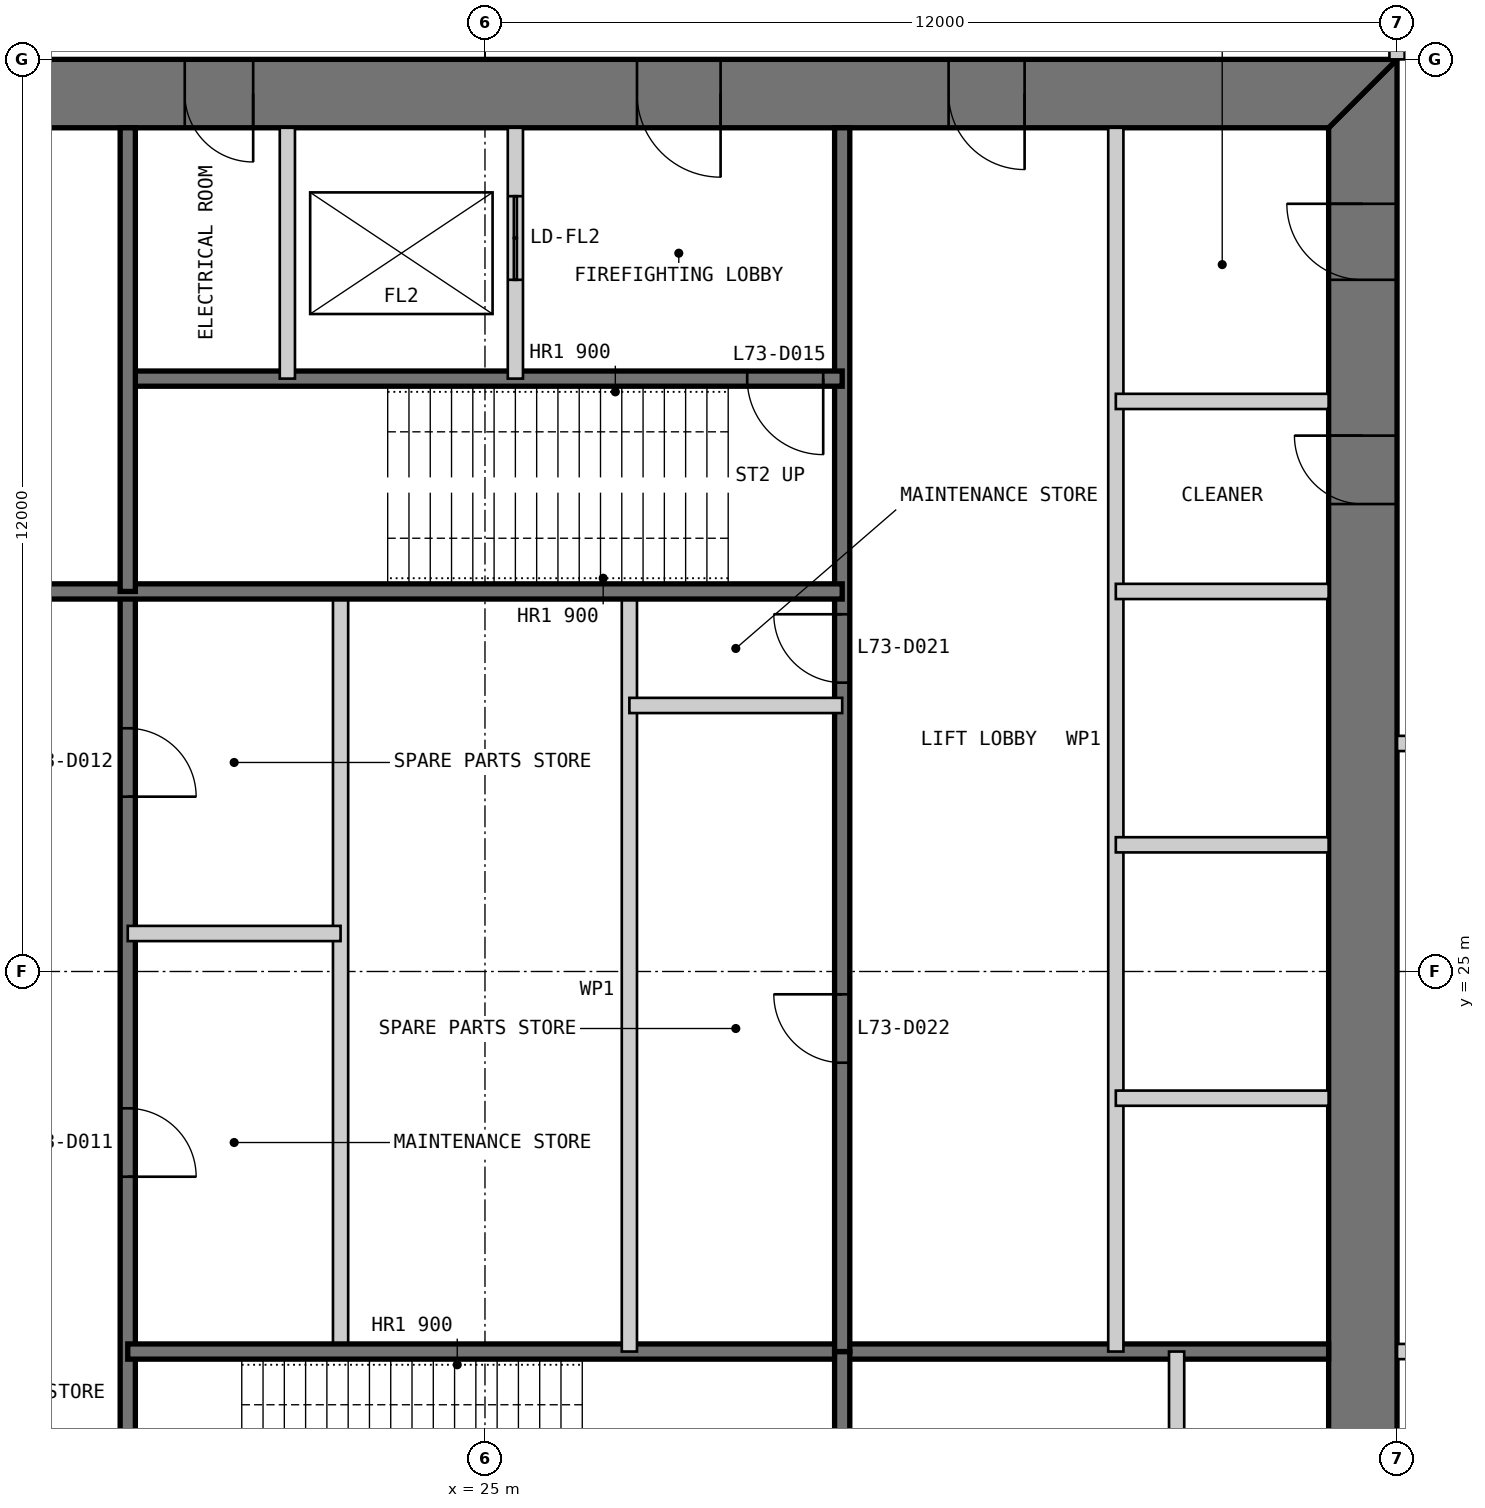
"""IFC4 building model, lengths in metres.
Left out: names, types, materials, properties, quantities, classifications, styles, units other than length and angle.
Written with IfcOpenShell. Run it as: python <this file> out.ifc"""

import sys

from ifc_helpers import new_model, si_unit, direction, frame, frame_2d, origin, place, context, subcontext, project, spatial, polyline, rectangle, outline, extrude, element, fill, save


model = new_model("IFC4")
c1 = context("Model", 3, precision=1e-05, world=origin(), true_north=direction((0.0, 1.0)))
c2 = subcontext(c1, "Body", "Model", "MODEL_VIEW")
j1 = project(units=[si_unit("LENGTHUNIT", "METRE"), si_unit("PLANEANGLEUNIT", "RADIAN")], contexts=[c1])
p1 = place(None, origin())
s1 = spatial("IfcSite", under=j1, at=p1, CompositionType="ELEMENT")
p2 = place(p1, origin())
s2 = spatial("IfcBuilding", under=s1, at=p2, CompositionType="ELEMENT")
p3 = place(p2, frame((0.0, 0.0, 301.8)))
s3 = spatial("IfcBuildingStorey", under=s2, at=p3, CompositionType="ELEMENT", Elevation=301.8)
p4 = place(p3, frame((36.55, 13.9, 0.0), z_axis=(0.0, 0.0, 1.0), x_axis=(0.0, 1.0, 0.0)))
e1 = element("IfcWall", 1, at=p4, inside=s3, PredefinedType="SHEAR", context=c2, shape_type="SweptSolid", body=[
    extrude(outline(polyline([(-0.9, -0.45), (23.1, -0.45), (22.2, 0.45), (0.0, 0.45), (-0.9, -0.45)])), origin(), (0.0, 0.0, 1.0), 6.0),
])
p5 = place(p4, frame((20.2, 0.0, 0.0)))
e2 = element("IfcOpeningElement", 2, at=p5, cuts=e1, PredefinedType="OPENING", context=c2, shape_type="SweptSolid", body=[
    extrude(rectangle(XDim=1.0, YDim=2.2, at=frame_2d((0.5, 1.1))), frame((0.0, 0.46, 0.0), z_axis=(0.0, -1.0, 0.0), x_axis=(1.0, 0.0, 0.0)), (0.0, 0.0, 1.0), 0.92),
])
p6 = place(p4, frame((17.25, 0.0, 0.0)))
e3 = element("IfcOpeningElement", 3, at=p6, cuts=e1, PredefinedType="OPENING", context=c2, shape_type="SweptSolid", body=[
    extrude(rectangle(XDim=0.9, YDim=2.2, at=frame_2d((0.45, 1.1))), frame((0.0, 0.46, 0.0), z_axis=(0.0, -1.0, 0.0), x_axis=(1.0, 0.0, 0.0)), (0.0, 0.0, 1.0), 0.92),
])
p7 = place(p3, frame((37.0, 36.55, 0.0), z_axis=(0.0, 0.0, 1.0), x_axis=(-1.0, 0.0, 0.0)))
e4 = element("IfcWall", 4, at=p7, inside=s3, PredefinedType="SHEAR", context=c2, shape_type="SweptSolid", body=[
    extrude(outline(polyline([(0.0, -0.45), (24.0, -0.45), (23.1, 0.45), (0.9, 0.45), (0.0, -0.45)])), origin(), (0.0, 0.0, 1.0), 6.0),
])
p8 = place(p7, frame((4.9, 0.0, 0.0)))
e5 = element("IfcOpeningElement", 5, at=p8, cuts=e4, PredefinedType="OPENING", context=c2, shape_type="SweptSolid", body=[
    extrude(rectangle(XDim=1.0, YDim=2.2, at=frame_2d((0.5, 1.1))), frame((0.0, 0.46, 0.0), z_axis=(0.0, -1.0, 0.0), x_axis=(1.0, 0.0, 0.0)), (0.0, 0.0, 1.0), 0.92),
])
p9 = place(p7, frame((8.9, 0.0, 0.0)))
e6 = element("IfcOpeningElement", 6, at=p9, cuts=e4, PredefinedType="OPENING", context=c2, shape_type="SweptSolid", body=[
    extrude(rectangle(XDim=1.1, YDim=2.2, at=frame_2d((0.55, 1.1))), frame((0.0, 0.46, 0.0), z_axis=(0.0, -1.0, 0.0), x_axis=(1.0, 0.0, 0.0)), (0.0, 0.0, 1.0), 0.92),
])
p10 = place(p7, frame((15.05, 0.0, 0.0)))
e7 = element("IfcOpeningElement", 7, at=p10, cuts=e4, PredefinedType="OPENING", context=c2, shape_type="SweptSolid", body=[
    extrude(rectangle(XDim=0.9, YDim=2.2, at=frame_2d((0.45, 1.1))), frame((0.0, 0.46, 0.0), z_axis=(0.0, -1.0, 0.0), x_axis=(1.0, 0.0, 0.0)), (0.0, 0.0, 1.0), 0.92),
])
p11 = place(p7, frame((17.9, 0.0, 0.0)))
e8 = element("IfcOpeningElement", 8, at=p11, cuts=e4, PredefinedType="OPENING", context=c2, shape_type="SweptSolid", body=[
    extrude(rectangle(XDim=1.0, YDim=2.2, at=frame_2d((0.5, 1.1))), frame((0.0, 0.46, 0.0), z_axis=(0.0, -1.0, 0.0), x_axis=(1.0, 0.0, 0.0)), (0.0, 0.0, 1.0), 0.92),
])
p12 = place(p7, frame((21.4, 0.0, 0.0)))
e9 = element("IfcOpeningElement", 9, at=p12, cuts=e4, PredefinedType="OPENING", context=c2, shape_type="SweptSolid", body=[
    extrude(rectangle(XDim=1.0, YDim=2.2, at=frame_2d((0.5, 1.1))), frame((0.0, 0.46, 0.0), z_axis=(0.0, -1.0, 0.0), x_axis=(1.0, 0.0, 0.0)), (0.0, 0.0, 1.0), 0.92),
])
p13 = place(p3, frame((20.3, 13.9, 0.0), z_axis=(0.0, 0.0, 1.0), x_axis=(0.0, 1.0, 0.0)))
e10 = element("IfcWall", 10, at=p13, inside=s3, PredefinedType="SOLIDWALL", context=c2, shape_type="SweptSolid", body=[
    extrude(rectangle(XDim=16.1, YDim=0.2, at=frame_2d((8.05, 0.0))), origin(), (0.0, 0.0, 1.0), 5.8),
])
p14 = place(p13, frame((8.4, 0.0, 0.0)))
e11 = element("IfcOpeningElement", 11, at=p14, cuts=e10, PredefinedType="OPENING", context=c2, shape_type="SweptSolid", body=[
    extrude(rectangle(XDim=0.9, YDim=2.2, at=frame_2d((0.45, 1.1))), frame((0.0, 0.11, 0.0), z_axis=(0.0, -1.0, 0.0), x_axis=(1.0, 0.0, 0.0)), (0.0, 0.0, 1.0), 0.22),
])
p15 = place(p13, frame((13.4, 0.0, 0.0)))
e12 = element("IfcOpeningElement", 12, at=p15, cuts=e10, PredefinedType="OPENING", context=c2, shape_type="SweptSolid", body=[
    extrude(rectangle(XDim=0.9, YDim=2.2, at=frame_2d((0.45, 1.1))), frame((0.0, 0.11, 0.0), z_axis=(0.0, -1.0, 0.0), x_axis=(1.0, 0.0, 0.0)), (0.0, 0.0, 1.0), 0.22),
])
p16 = place(p3, frame((23.1, 20.0, 0.0), z_axis=(0.0, 0.0, 1.0), x_axis=(0.0, 1.0, 0.0)))
e13 = element("IfcWall", 13, at=p16, inside=s3, PredefinedType="PARTITIONING", context=c2, shape_type="SweptSolid", body=[
    extrude(rectangle(XDim=10.0, YDim=0.2, at=frame_2d((5.0, 0.0))), origin(), (0.0, 0.0, 1.0), 5.8),
])
p17 = place(p3, frame((20.3, 20.0, 0.0), z_axis=(0.0, 0.0, 1.0), x_axis=(1.0, 0.0, 0.0)))
e14 = element("IfcWall", 14, at=p17, inside=s3, PredefinedType="SOLIDWALL", context=c2, shape_type="SweptSolid", body=[
    extrude(rectangle(XDim=15.8, YDim=0.2, at=frame_2d((7.9, 0.0))), origin(), (0.0, 0.0, 1.0), 5.8),
])
p18 = place(p3, frame((29.7, 13.9, 0.0), z_axis=(0.0, 0.0, 1.0), x_axis=(0.0, 1.0, 0.0)))
e15 = element("IfcWall", 15, at=p18, inside=s3, PredefinedType="SOLIDWALL", context=c2, shape_type="SweptSolid", body=[
    extrude(rectangle(XDim=6.1, YDim=0.2, at=frame_2d((3.05, 0.0))), origin(), (0.0, 0.0, 1.0), 5.8),
])
p19 = place(p3, frame((34.1, 13.9, 0.0), z_axis=(0.0, 0.0, 1.0), x_axis=(0.0, 1.0, 0.0)))
e16 = element("IfcWall", 16, at=p19, inside=s3, PredefinedType="PARTITIONING", context=c2, shape_type="SweptSolid", body=[
    extrude(rectangle(XDim=6.1, YDim=0.2, at=frame_2d((3.05, 0.0))), origin(), (0.0, 0.0, 1.0), 5.8),
])
p20 = place(p3, frame((20.3, 25.5, 0.0), z_axis=(0.0, 0.0, 1.0), x_axis=(1.0, 0.0, 0.0)))
e17 = element("IfcWall", 17, at=p20, inside=s3, PredefinedType="PARTITIONING", context=c2, shape_type="SweptSolid", body=[
    extrude(rectangle(XDim=2.8, YDim=0.2, at=frame_2d((1.4, 0.0))), origin(), (0.0, 0.0, 1.0), 5.8),
])
p21 = place(p3, frame((33.3, 36.1, 0.0), z_axis=(0.0, 0.0, 1.0), x_axis=(0.0, -1.0, 0.0)))
e18 = element("IfcWall", 18, at=p21, inside=s3, PredefinedType="PARTITIONING", context=c2, shape_type="SweptSolid", body=[
    extrude(rectangle(XDim=16.1, YDim=0.2, at=frame_2d((8.05, 0.0))), origin(), (0.0, 0.0, 1.0), 5.8),
])
p22 = place(p3, frame((29.7, 36.1, 0.0), z_axis=(0.0, 0.0, 1.0), x_axis=(0.0, -1.0, 0.0)))
e19 = element("IfcWall", 19, at=p22, inside=s3, PredefinedType="SOLIDWALL", context=c2, shape_type="SweptSolid", body=[
    extrude(rectangle(XDim=16.1, YDim=0.2, at=frame_2d((8.05, 0.0))), origin(), (0.0, 0.0, 1.0), 5.8),
])
p23 = place(p22, frame((6.4, 0.0, 0.0)))
e20 = element("IfcOpeningElement", 20, at=p23, cuts=e19, PredefinedType="OPENING", context=c2, shape_type="SweptSolid", body=[
    extrude(rectangle(XDim=0.9, YDim=2.2, at=frame_2d((0.45, 1.1))), frame((0.0, 0.11, 0.0), z_axis=(0.0, -1.0, 0.0), x_axis=(1.0, 0.0, 0.0)), (0.0, 0.0, 1.0), 0.22),
])
p24 = place(p22, frame((11.4, 0.0, 0.0)))
e21 = element("IfcOpeningElement", 21, at=p24, cuts=e19, PredefinedType="OPENING", context=c2, shape_type="SweptSolid", body=[
    extrude(rectangle(XDim=0.9, YDim=2.2, at=frame_2d((0.45, 1.1))), frame((0.0, 0.11, 0.0), z_axis=(0.0, -1.0, 0.0), x_axis=(1.0, 0.0, 0.0)), (0.0, 0.0, 1.0), 0.22),
])
for number, where, z_axis, x_axis in (
    (22, (36.1, 30.0, 0.0), (0.0, 0.0, 1.0), (-1.0, 0.0, 0.0)),
    (23, (36.1, 26.667, 0.0), (0.0, 0.0, 1.0), (-1.0, 0.0, 0.0)),
    (24, (36.1, 23.333, 0.0), (0.0, 0.0, 1.0), (-1.0, 0.0, 0.0)),
):
    element("IfcWall", number, at=place(p3, frame(where, z_axis=z_axis, x_axis=x_axis)), inside=s3, PredefinedType="PARTITIONING", context=c2, shape_type="SweptSolid", body=[
        extrude(rectangle(XDim=2.8, YDim=0.2, at=frame_2d((1.4, 0.0))), origin(), (0.0, 0.0, 1.0), 5.8),
    ])
p25 = place(p3, frame((26.9, 30.0, 0.0), z_axis=(0.0, 0.0, 1.0), x_axis=(0.0, -1.0, 0.0)))
e25 = element("IfcWall", 25, at=p25, inside=s3, PredefinedType="PARTITIONING", context=c2, shape_type="SweptSolid", body=[
    extrude(rectangle(XDim=10.0, YDim=0.2, at=frame_2d((5.0, 0.0))), origin(), (0.0, 0.0, 1.0), 5.8),
])
p26 = place(p3, frame((29.7, 32.8, 0.0), z_axis=(0.0, 0.0, 1.0), x_axis=(-1.0, 0.0, 0.0)))
e26 = element("IfcWall", 26, at=p26, inside=s3, PredefinedType="SOLIDWALL", context=c2, shape_type="SweptSolid", body=[
    extrude(rectangle(XDim=9.4, YDim=0.2, at=frame_2d((4.7, 0.0))), origin(), (0.0, 0.0, 1.0), 5.8),
])
p27 = place(p26, frame((0.25, 0.0, 0.0)))
e27 = element("IfcOpeningElement", 27, at=p27, cuts=e26, PredefinedType="OPENING", context=c2, shape_type="SweptSolid", body=[
    extrude(rectangle(XDim=1.0, YDim=2.2, at=frame_2d((0.5, 1.1))), frame((0.0, 0.11, 0.0), z_axis=(0.0, -1.0, 0.0), x_axis=(1.0, 0.0, 0.0)), (0.0, 0.0, 1.0), 0.22),
])
p28 = place(p3, frame((29.7, 30.0, 0.0), z_axis=(0.0, 0.0, 1.0), x_axis=(-1.0, 0.0, 0.0)))
e28 = element("IfcWall", 28, at=p28, inside=s3, PredefinedType="SOLIDWALL", context=c2, shape_type="SweptSolid", body=[
    extrude(rectangle(XDim=15.8, YDim=0.2, at=frame_2d((7.9, 0.0))), origin(), (0.0, 0.0, 1.0), 5.8),
])
p29 = place(p3, frame((25.4, 36.1, 0.0), z_axis=(0.0, 0.0, 1.0), x_axis=(0.0, -1.0, 0.0)))
e29 = element("IfcWall", 29, at=p29, inside=s3, PredefinedType="PARTITIONING", context=c2, shape_type="SweptSolid", body=[
    extrude(rectangle(XDim=3.3, YDim=0.2, at=frame_2d((1.65, 0.0))), origin(), (0.0, 0.0, 1.0), 5.8),
])
p30 = place(p29, frame((0.9, 0.0, 0.0)))
e30 = element("IfcOpeningElement", 30, at=p30, cuts=e29, PredefinedType="OPENING", context=c2, shape_type="SweptSolid", body=[
    extrude(rectangle(XDim=1.1, YDim=2.2, at=frame_2d((0.55, 1.1))), frame((0.0, 0.11, 0.0), z_axis=(0.0, -1.0, 0.0), x_axis=(1.0, 0.0, 0.0)), (0.0, 0.0, 1.0), 0.22),
])
p31 = place(p3, frame((22.4, 36.1, 0.0), z_axis=(0.0, 0.0, 1.0), x_axis=(0.0, -1.0, 0.0)))
e31 = element("IfcWall", 31, at=p31, inside=s3, PredefinedType="PARTITIONING", context=c2, shape_type="SweptSolid", body=[
    extrude(rectangle(XDim=3.3, YDim=0.2, at=frame_2d((1.65, 0.0))), origin(), (0.0, 0.0, 1.0), 5.8),
])
p32 = place(p3, frame((20.3, 36.1, 0.0), z_axis=(0.0, 0.0, 1.0), x_axis=(0.0, -1.0, 0.0)))
e32 = element("IfcWall", 32, at=p32, inside=s3, PredefinedType="SOLIDWALL", context=c2, shape_type="SweptSolid", body=[
    extrude(rectangle(XDim=6.1, YDim=0.2, at=frame_2d((3.05, 0.0))), origin(), (0.0, 0.0, 1.0), 5.8),
])
for number, where, z_axis, x_axis in (
    (33, (36.1, 32.5, 0.0), (0.0, 0.0, 1.0), (-1.0, 0.0, 0.0)),
    (34, (29.7, 28.5, 0.0), (0.0, 0.0, 1.0), (-1.0, 0.0, 0.0)),
):
    element("IfcWall", number, at=place(p3, frame(where, z_axis=z_axis, x_axis=x_axis)), inside=s3, PredefinedType="PARTITIONING", context=c2, shape_type="SweptSolid", body=[
        extrude(rectangle(XDim=2.8, YDim=0.2, at=frame_2d((1.4, 0.0))), origin(), (0.0, 0.0, 1.0), 5.8),
    ])
p33 = place(p3, frame((37.0, 37.0, 0.0), z_axis=(0.0, 0.0, 1.0), x_axis=(0.0, 1.0, 0.0)))
e35 = element("IfcWall", 35, at=p33, inside=s3, PredefinedType="PARTITIONING", context=c2, shape_type="SweptSolid", body=[
    extrude(rectangle(XDim=2.4, YDim=0.2, at=frame_2d((1.2, 0.0))), origin(), (0.0, 0.0, 1.0), 4.853),
])
p34 = place(p3, frame((37.0, 20.0, 0.0), z_axis=(0.0, 0.0, 1.0), x_axis=(1.0, 0.0, 0.0)))
e36 = element("IfcWall", 36, at=p34, inside=s3, PredefinedType="PARTITIONING", context=c2, shape_type="SweptSolid", body=[
    extrude(rectangle(XDim=13.0, YDim=0.2, at=frame_2d((6.5, 0.0))), origin(), (0.0, 0.0, 1.0), 5.8),
])
p35 = place(p34, frame((5.6, 0.0, 0.0)))
e37 = element("IfcOpeningElement", 37, at=p35, cuts=e36, PredefinedType="OPENING", context=c2, shape_type="SweptSolid", body=[
    extrude(rectangle(XDim=1.8, YDim=2.4, at=frame_2d((0.9, 1.2))), frame((0.0, 0.11, 0.0), z_axis=(0.0, -1.0, 0.0), x_axis=(1.0, 0.0, 0.0)), (0.0, 0.0, 1.0), 0.22),
])
p36 = place(p3, frame((37.0, 28.0, 0.0), z_axis=(0.0, 0.0, 1.0), x_axis=(1.0, 0.0, 0.0)))
e38 = element("IfcWall", 38, at=p36, inside=s3, PredefinedType="PARTITIONING", context=c2, shape_type="SweptSolid", body=[
    extrude(rectangle(XDim=13.0, YDim=0.2, at=frame_2d((6.5, 0.0))), origin(), (0.0, 0.0, 1.0), 5.8),
])
p37 = place(p36, frame((5.6, 0.0, 0.0)))
e39 = element("IfcOpeningElement", 39, at=p37, cuts=e38, PredefinedType="OPENING", context=c2, shape_type="SweptSolid", body=[
    extrude(rectangle(XDim=1.8, YDim=2.4, at=frame_2d((0.9, 1.2))), frame((0.0, 0.11, 0.0), z_axis=(0.0, -1.0, 0.0), x_axis=(1.0, 0.0, 0.0)), (0.0, 0.0, 1.0), 0.22),
])
p38 = place(p14, frame((0.9, 0.0, 0.0), z_axis=(0.0, 0.0, 1.0), x_axis=(-1.0, 0.0, 0.0)))
e40 = element("IfcDoor", 40, at=p38, inside=s3, OperationType="SINGLE_SWING_RIGHT", PredefinedType="DOOR", context=c2, shape_type="SweptSolid", body=[
    extrude(rectangle(XDim=0.9, YDim=2.2, at=frame_2d((0.45, 1.1))), frame((0.0, 0.025, 0.0), z_axis=(0.0, -1.0, 0.0), x_axis=(1.0, 0.0, 0.0)), (0.0, 0.0, 1.0), 0.05),
])
fill(e11, e40)
p39 = place(p15, frame((0.9, 0.0, 0.0), z_axis=(0.0, 0.0, 1.0), x_axis=(-1.0, 0.0, 0.0)))
e41 = element("IfcDoor", 41, at=p39, inside=s3, OperationType="SINGLE_SWING_RIGHT", PredefinedType="DOOR", context=c2, shape_type="SweptSolid", body=[
    extrude(rectangle(XDim=0.9, YDim=2.2, at=frame_2d((0.45, 1.1))), frame((0.0, 0.025, 0.0), z_axis=(0.0, -1.0, 0.0), x_axis=(1.0, 0.0, 0.0)), (0.0, 0.0, 1.0), 0.05),
])
fill(e12, e41)
p40 = place(p8, origin())
e42 = element("IfcDoor", 42, at=p40, inside=s3, OperationType="SINGLE_SWING_LEFT", PredefinedType="DOOR", context=c2, shape_type="SweptSolid", body=[
    extrude(rectangle(XDim=1.0, YDim=2.2, at=frame_2d((0.5, 1.1))), frame((0.0, 0.025, 0.0), z_axis=(0.0, -1.0, 0.0), x_axis=(1.0, 0.0, 0.0)), (0.0, 0.0, 1.0), 0.05),
    extrude(outline(polyline([(0.0, 0.0), (0.04, 0.0), (0.04, 2.16), (0.96, 2.16), (0.96, 0.0), (1.0, 0.0), (1.0, 2.2), (0.0, 2.2), (0.0, 0.0)])), frame((0.0, 0.3, 0.0), z_axis=(0.0, -1.0, 0.0), x_axis=(1.0, 0.0, 0.0)), (0.0, 0.0, 1.0), 0.6),
])
fill(e5, e42)
p41 = place(p9, origin())
e43 = element("IfcDoor", 43, at=p41, inside=s3, OperationType="SINGLE_SWING_LEFT", PredefinedType="DOOR", context=c2, shape_type="SweptSolid", body=[
    extrude(rectangle(XDim=1.1, YDim=2.2, at=frame_2d((0.55, 1.1))), frame((0.0, 0.025, 0.0), z_axis=(0.0, -1.0, 0.0), x_axis=(1.0, 0.0, 0.0)), (0.0, 0.0, 1.0), 0.05),
    extrude(outline(polyline([(0.0, 0.0), (0.04, 0.0), (0.04, 2.16), (1.06, 2.16), (1.06, 0.0), (1.1, 0.0), (1.1, 2.2), (0.0, 2.2), (0.0, 0.0)])), frame((0.0, 0.3, 0.0), z_axis=(0.0, -1.0, 0.0), x_axis=(1.0, 0.0, 0.0)), (0.0, 0.0, 1.0), 0.6),
])
fill(e6, e43)
p42 = place(p27, origin())
e44 = element("IfcDoor", 44, at=p42, inside=s3, OperationType="SINGLE_SWING_LEFT", PredefinedType="DOOR", context=c2, shape_type="SweptSolid", body=[
    extrude(rectangle(XDim=1.0, YDim=2.2, at=frame_2d((0.5, 1.1))), frame((0.0, 0.025, 0.0), z_axis=(0.0, -1.0, 0.0), x_axis=(1.0, 0.0, 0.0)), (0.0, 0.0, 1.0), 0.05),
])
fill(e27, e44)
p43 = place(p10, origin())
e45 = element("IfcDoor", 45, at=p43, inside=s3, OperationType="SINGLE_SWING_LEFT", PredefinedType="DOOR", context=c2, shape_type="SweptSolid", body=[
    extrude(rectangle(XDim=0.9, YDim=2.2, at=frame_2d((0.45, 1.1))), frame((0.0, 0.025, 0.0), z_axis=(0.0, -1.0, 0.0), x_axis=(1.0, 0.0, 0.0)), (0.0, 0.0, 1.0), 0.05),
    extrude(outline(polyline([(0.0, 0.0), (0.04, 0.0), (0.04, 2.16), (0.86, 2.16), (0.86, 0.0), (0.9, 0.0), (0.9, 2.2), (0.0, 2.2), (0.0, 0.0)])), frame((0.0, 0.3, 0.0), z_axis=(0.0, -1.0, 0.0), x_axis=(1.0, 0.0, 0.0)), (0.0, 0.0, 1.0), 0.6),
])
fill(e7, e45)
p44 = place(p5, origin())
e46 = element("IfcDoor", 46, at=p44, inside=s3, OperationType="SINGLE_SWING_RIGHT", PredefinedType="DOOR", context=c2, shape_type="SweptSolid", body=[
    extrude(rectangle(XDim=1.0, YDim=2.2, at=frame_2d((0.5, 1.1))), frame((0.0, 0.025, 0.0), z_axis=(0.0, -1.0, 0.0), x_axis=(1.0, 0.0, 0.0)), (0.0, 0.0, 1.0), 0.05),
    extrude(outline(polyline([(0.0, 0.0), (0.04, 0.0), (0.04, 2.16), (0.96, 2.16), (0.96, 0.0), (1.0, 0.0), (1.0, 2.2), (0.0, 2.2), (0.0, 0.0)])), frame((0.0, 0.3, 0.0), z_axis=(0.0, -1.0, 0.0), x_axis=(1.0, 0.0, 0.0)), (0.0, 0.0, 1.0), 0.6),
])
fill(e2, e46)
p45 = place(p6, origin())
e47 = element("IfcDoor", 47, at=p45, inside=s3, OperationType="SINGLE_SWING_RIGHT", PredefinedType="DOOR", context=c2, shape_type="SweptSolid", body=[
    extrude(rectangle(XDim=0.9, YDim=2.2, at=frame_2d((0.45, 1.1))), frame((0.0, 0.025, 0.0), z_axis=(0.0, -1.0, 0.0), x_axis=(1.0, 0.0, 0.0)), (0.0, 0.0, 1.0), 0.05),
    extrude(outline(polyline([(0.0, 0.0), (0.04, 0.0), (0.04, 2.16), (0.86, 2.16), (0.86, 0.0), (0.9, 0.0), (0.9, 2.2), (0.0, 2.2), (0.0, 0.0)])), frame((0.0, 0.3, 0.0), z_axis=(0.0, -1.0, 0.0), x_axis=(1.0, 0.0, 0.0)), (0.0, 0.0, 1.0), 0.6),
])
fill(e3, e47)
p46 = place(p23, frame((0.9, 0.0, 0.0), z_axis=(0.0, 0.0, 1.0), x_axis=(-1.0, 0.0, 0.0)))
e48 = element("IfcDoor", 48, at=p46, inside=s3, OperationType="SINGLE_SWING_RIGHT", PredefinedType="DOOR", context=c2, shape_type="SweptSolid", body=[
    extrude(rectangle(XDim=0.9, YDim=2.2, at=frame_2d((0.45, 1.1))), frame((0.0, 0.025, 0.0), z_axis=(0.0, -1.0, 0.0), x_axis=(1.0, 0.0, 0.0)), (0.0, 0.0, 1.0), 0.05),
])
fill(e20, e48)
p47 = place(p24, frame((0.9, 0.0, 0.0), z_axis=(0.0, 0.0, 1.0), x_axis=(-1.0, 0.0, 0.0)))
e49 = element("IfcDoor", 49, at=p47, inside=s3, OperationType="SINGLE_SWING_RIGHT", PredefinedType="DOOR", context=c2, shape_type="SweptSolid", body=[
    extrude(rectangle(XDim=0.9, YDim=2.2, at=frame_2d((0.45, 1.1))), frame((0.0, 0.025, 0.0), z_axis=(0.0, -1.0, 0.0), x_axis=(1.0, 0.0, 0.0)), (0.0, 0.0, 1.0), 0.05),
])
fill(e21, e49)
p48 = place(p30, origin())
e50 = element("IfcDoor", 50, at=p48, inside=s3, OperationType="DOUBLE_DOOR_SLIDING", PredefinedType="DOOR", context=c2, shape_type="SweptSolid", body=[
    extrude(rectangle(XDim=1.1, YDim=2.2, at=frame_2d((0.55, 1.1))), frame((0.0, 0.025, 0.0), z_axis=(0.0, -1.0, 0.0), x_axis=(1.0, 0.0, 0.0)), (0.0, 0.0, 1.0), 0.05),
])
fill(e30, e50)
save(model, sys.argv[1])
